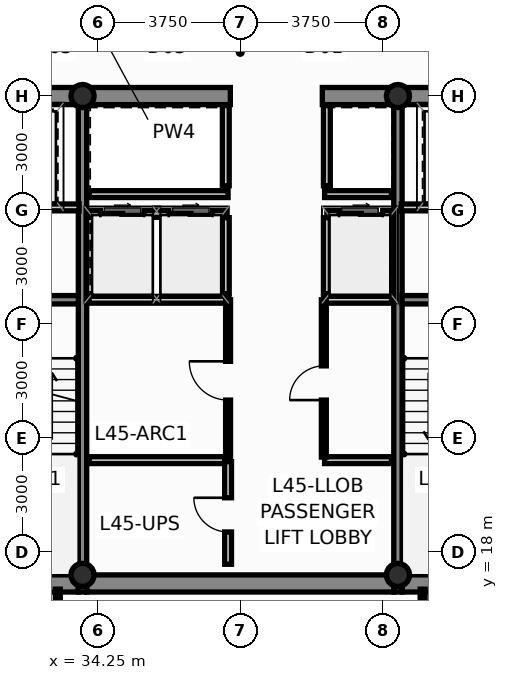
"""IFC4 building model, lengths in metres.
Left out: names, types, materials, properties, quantities, classifications, styles, units other than length and angle.
Written with IfcOpenShell. Run it as: python <this file> out.ifc"""

import sys

from ifc_helpers import new_model, si_unit, direction, frame, frame_2d, origin, origin_2d, place, context, subcontext, project, spatial, rectangle, hollow_circle, extrude, source, transform, mapped, element, fill, save


model = new_model("IFC4")
c1 = context("Model", 3, precision=1e-05, world=origin(), true_north=direction((0.0, 1.0)))
c2 = subcontext(c1, "Body", "Model", "MODEL_VIEW")
j1 = project(units=[si_unit("LENGTHUNIT", "METRE"), si_unit("PLANEANGLEUNIT", "RADIAN")], contexts=[c1])
p1 = place(None, origin())
s1 = spatial("IfcSite", under=j1, at=p1, CompositionType="ELEMENT")
p2 = place(p1, origin())
s2 = spatial("IfcBuilding", under=s1, at=p2, CompositionType="ELEMENT")
p3 = place(p2, frame((0.0, 0.0, 173.1)))
s3 = spatial("IfcBuildingStorey", under=s2, at=p3, CompositionType="ELEMENT", Elevation=173.1)
m1 = source(origin(), c2, "Body", "SweptSolid", [
    extrude(hollow_circle(Radius=0.305, WallThickness=0.025, at=origin_2d()), origin(), (0.0, 0.0, 1.0), 3.65),
])
for number, where, z_axis, x_axis in (
    (1, (33.85, 17.4, 0.0), (0.0, 0.0, 1.0), (1.0, 0.0, 0.0)),
    (2, (42.15, 17.4, 0.0), (0.0, 0.0, 1.0), (1.0, 0.0, 0.0)),
    (3, (33.85, 30.0, 0.0), (0.0, 0.0, 1.0), (1.0, 0.0, 0.0)),
    (4, (42.15, 30.0, 0.0), (0.0, 0.0, 1.0), (1.0, 0.0, 0.0)),
):
    element("IfcColumn", number, at=place(p3, frame(where, z_axis=z_axis, x_axis=x_axis)), inside=s3, PredefinedType="COLUMN", context=c2, shape_type="MappedRepresentation", body=[
        mapped(m1, transform((0.0, 0.0, 0.0), scale=1.0)),
    ])
p4 = place(p3, frame((30.84, 17.175, 0.0), z_axis=(0.0, 0.0, 1.0), x_axis=(1.0, 0.0, 0.0)))
e5 = element("IfcWall", 5, at=p4, inside=s3, PredefinedType="SHEAR", context=c2, shape_type="SweptSolid", body=[
    extrude(rectangle(XDim=2.9, YDim=0.45, at=frame_2d((1.45, 0.0))), origin(), (0.0, 0.0, 1.0), 3.65),
])
p5 = place(p3, frame((33.96, 17.175, 0.0), z_axis=(0.0, 0.0, 1.0), x_axis=(1.0, 0.0, 0.0)))
e6 = element("IfcWall", 6, at=p5, inside=s3, PredefinedType="SHEAR", context=c2, shape_type="SweptSolid", body=[
    extrude(rectangle(XDim=8.08, YDim=0.45, at=frame_2d((4.04, 0.0))), origin(), (0.0, 0.0, 1.0), 3.65),
])
for number, where, z_axis, x_axis in (
    (7, (42.26, 17.175, 0.0), (0.0, 0.0, 1.0), (1.0, 0.0, 0.0)),
    (8, (30.84, 30.0, 0.0), (0.0, 0.0, 1.0), (1.0, 0.0, 0.0)),
):
    element("IfcWall", number, at=place(p3, frame(where, z_axis=z_axis, x_axis=x_axis)), inside=s3, PredefinedType="SHEAR", context=c2, shape_type="SweptSolid", body=[
        extrude(rectangle(XDim=2.9, YDim=0.45, at=frame_2d((1.45, 0.0))), origin(), (0.0, 0.0, 1.0), 3.65),
    ])
p6 = place(p3, frame((33.96, 30.0, 0.0), z_axis=(0.0, 0.0, 1.0), x_axis=(1.0, 0.0, 0.0)))
e9 = element("IfcWall", 9, at=p6, inside=s3, PredefinedType="SHEAR", context=c2, shape_type="SweptSolid", body=[
    extrude(rectangle(XDim=3.78, YDim=0.45, at=frame_2d((1.89, 0.0))), origin(), (0.0, 0.0, 1.0), 3.65),
])
p7 = place(p3, frame((40.16, 30.0, 0.0), z_axis=(0.0, 0.0, 1.0), x_axis=(1.0, 0.0, 0.0)))
e10 = element("IfcWall", 10, at=p7, inside=s3, PredefinedType="SHEAR", context=c2, shape_type="SweptSolid", body=[
    extrude(rectangle(XDim=1.88, YDim=0.45, at=frame_2d((0.94, 0.0))), origin(), (0.0, 0.0, 1.0), 3.65),
])
p8 = place(p3, frame((42.26, 30.0, 0.0), z_axis=(0.0, 0.0, 1.0), x_axis=(1.0, 0.0, 0.0)))
e11 = element("IfcWall", 11, at=p8, inside=s3, PredefinedType="SHEAR", context=c2, shape_type="SweptSolid", body=[
    extrude(rectangle(XDim=2.9, YDim=0.45, at=frame_2d((1.45, 0.0))), origin(), (0.0, 0.0, 1.0), 3.65),
])
for number, where, z_axis, x_axis in (
    (12, (33.85, 16.95, 0.0), (0.0, 0.0, 1.0), (0.0, 1.0, 0.0)),
    (13, (42.15, 16.95, 0.0), (0.0, 0.0, 1.0), (0.0, 1.0, 0.0)),
):
    element("IfcWall", number, at=place(p3, frame(where, z_axis=z_axis, x_axis=x_axis)), inside=s3, PredefinedType="SHEAR", context=c2, shape_type="SweptSolid", body=[
        extrude(rectangle(XDim=13.275, YDim=0.22, at=frame_2d((6.638, 0.0))), origin(), (0.0, 0.0, 1.0), 3.65),
    ])
for number, where, z_axis, x_axis in (
    (14, (30.84, 24.64, 0.0), (0.0, 0.0, 1.0), (1.0, 0.0, 0.0)),
    (15, (42.26, 24.64, 0.0), (0.0, 0.0, 1.0), (1.0, 0.0, 0.0)),
):
    element("IfcWall", number, at=place(p3, frame(where, z_axis=z_axis, x_axis=x_axis)), inside=s3, PredefinedType="SHEAR", context=c2, shape_type="SweptSolid", body=[
        extrude(rectangle(XDim=2.9, YDim=0.22, at=frame_2d((1.45, 0.0))), origin(), (0.0, 0.0, 1.0), 3.65),
    ])
p9 = place(p3, frame((34.02, 26.9, 0.0), z_axis=(0.0, 0.0, 1.0), x_axis=(1.0, 0.0, 0.0)))
e16 = element("IfcWall", 16, at=p9, inside=s3, PredefinedType="PARTITIONING", context=c2, shape_type="SweptSolid", body=[
    extrude(rectangle(XDim=3.6, YDim=0.18, at=frame_2d((1.8, 0.0))), origin(), (0.0, 0.0, 1.0), 3.4),
])
p10 = place(p9, frame((0.3, 0.0, 0.0)))
e17 = element("IfcOpeningElement", 17, at=p10, cuts=e16, PredefinedType="OPENING", context=c2, shape_type="SweptSolid", body=[
    extrude(rectangle(XDim=1.15, YDim=2.2, at=frame_2d((0.575, 1.1))), frame((0.0, 0.102, 0.0), z_axis=(0.0, -1.0, 0.0), x_axis=(1.0, 0.0, 0.0)), (0.0, 0.0, 1.0), 0.204),
])
p11 = place(p9, frame((2.1, 0.0, 0.0)))
e18 = element("IfcOpeningElement", 18, at=p11, cuts=e16, PredefinedType="OPENING", context=c2, shape_type="SweptSolid", body=[
    extrude(rectangle(XDim=1.15, YDim=2.2, at=frame_2d((0.575, 1.1))), frame((0.0, 0.102, 0.0), z_axis=(0.0, -1.0, 0.0), x_axis=(1.0, 0.0, 0.0)), (0.0, 0.0, 1.0), 0.204),
])
p12 = place(p3, frame((40.28, 26.9, 0.0), z_axis=(0.0, 0.0, 1.0), x_axis=(1.0, 0.0, 0.0)))
e19 = element("IfcWall", 19, at=p12, inside=s3, PredefinedType="PARTITIONING", context=c2, shape_type="SweptSolid", body=[
    extrude(rectangle(XDim=1.7, YDim=0.18, at=frame_2d((0.85, 0.0))), origin(), (0.0, 0.0, 1.0), 3.4),
])
p13 = place(p12, frame((0.32, 0.0, 0.0)))
e20 = element("IfcOpeningElement", 20, at=p13, cuts=e19, PredefinedType="OPENING", context=c2, shape_type="SweptSolid", body=[
    extrude(rectangle(XDim=1.15, YDim=2.2, at=frame_2d((0.575, 1.1))), frame((0.0, 0.102, 0.0), z_axis=(0.0, -1.0, 0.0), x_axis=(1.0, 0.0, 0.0)), (0.0, 0.0, 1.0), 0.204),
])
for number, where, z_axis, x_axis in (
    (21, (37.62, 24.8, 0.0), (0.0, 0.0, 1.0), (0.0, 1.0, 0.0)),
    (22, (40.28, 24.8, 0.0), (0.0, 0.0, 1.0), (0.0, 1.0, 0.0)),
):
    element("IfcWall", number, at=place(p3, frame(where, z_axis=z_axis, x_axis=x_axis)), inside=s3, PredefinedType="PARTITIONING", context=c2, shape_type="SweptSolid", body=[
        extrude(rectangle(XDim=2.0, YDim=0.18, at=frame_2d((1.0, 0.0))), origin(), (0.0, 0.0, 1.0), 3.4),
    ])
p14 = place(p3, frame((34.02, 24.64, 0.0), z_axis=(0.0, 0.0, 1.0), x_axis=(1.0, 0.0, 0.0)))
e23 = element("IfcWall", 23, at=p14, inside=s3, PredefinedType="PARTITIONING", context=c2, shape_type="SweptSolid", body=[
    extrude(rectangle(XDim=3.68, YDim=0.18, at=frame_2d((1.84, 0.0))), origin(), (0.0, 0.0, 1.0), 3.4),
])
p15 = place(p3, frame((40.2, 24.64, 0.0), z_axis=(0.0, 0.0, 1.0), x_axis=(1.0, 0.0, 0.0)))
e24 = element("IfcWall", 24, at=p15, inside=s3, PredefinedType="PARTITIONING", context=c2, shape_type="SweptSolid", body=[
    extrude(rectangle(XDim=1.78, YDim=0.18, at=frame_2d((0.89, 0.0))), origin(), (0.0, 0.0, 1.0), 3.4),
])
p16 = place(p3, frame((34.02, 27.42, 0.0), z_axis=(0.0, 0.0, 1.0), x_axis=(1.0, 0.0, 0.0)))
e25 = element("IfcWall", 25, at=p16, inside=s3, PredefinedType="PARTITIONING", context=c2, shape_type="SweptSolid", body=[
    extrude(rectangle(XDim=3.66, YDim=0.18, at=frame_2d((1.83, 0.0))), origin(), (0.0, 0.0, 1.0), 3.4),
])
p17 = place(p3, frame((40.22, 27.42, 0.0), z_axis=(0.0, 0.0, 1.0), x_axis=(1.0, 0.0, 0.0)))
e26 = element("IfcWall", 26, at=p17, inside=s3, PredefinedType="PARTITIONING", context=c2, shape_type="SweptSolid", body=[
    extrude(rectangle(XDim=1.76, YDim=0.18, at=frame_2d((0.88, 0.0))), origin(), (0.0, 0.0, 1.0), 3.4),
])
for number, where, z_axis, x_axis in (
    (27, (37.62, 27.64, 0.0), (0.0, 0.0, 1.0), (0.0, 1.0, 0.0)),
    (28, (40.28, 27.64, 0.0), (0.0, 0.0, 1.0), (0.0, 1.0, 0.0)),
):
    element("IfcWall", number, at=place(p3, frame(where, z_axis=z_axis, x_axis=x_axis)), inside=s3, PredefinedType="PARTITIONING", context=c2, shape_type="SweptSolid", body=[
        extrude(rectangle(XDim=2.11, YDim=0.18, at=frame_2d((1.055, 0.0))), origin(), (0.0, 0.0, 1.0), 3.4),
    ])
for number, where, z_axis, x_axis in (
    (29, (30.86, 27.07, 0.0), (0.0, 0.0, 1.0), (1.0, 0.0, 0.0)),
    (30, (42.24, 27.07, 0.0), (0.0, 0.0, 1.0), (1.0, 0.0, 0.0)),
):
    element("IfcWall", number, at=place(p3, frame(where, z_axis=z_axis, x_axis=x_axis)), inside=s3, PredefinedType="PARTITIONING", context=c2, shape_type="SweptSolid", body=[
        extrude(rectangle(XDim=2.9, YDim=0.18, at=frame_2d((1.45, 0.0))), origin(), (0.0, 0.0, 1.0), 3.4),
    ])
p18 = place(p3, frame((34.02, 20.42, 0.0), z_axis=(0.0, 0.0, 1.0), x_axis=(1.0, 0.0, 0.0)))
e31 = element("IfcWall", 31, at=p18, inside=s3, PredefinedType="PARTITIONING", context=c2, shape_type="SweptSolid", body=[
    extrude(rectangle(XDim=3.64, YDim=0.18, at=frame_2d((1.82, 0.0))), origin(), (0.0, 0.0, 1.0), 3.4),
])
p19 = place(p3, frame((40.22, 20.42, 0.0), z_axis=(0.0, 0.0, 1.0), x_axis=(1.0, 0.0, 0.0)))
e32 = element("IfcWall", 32, at=p19, inside=s3, PredefinedType="PARTITIONING", context=c2, shape_type="SweptSolid", body=[
    extrude(rectangle(XDim=1.76, YDim=0.18, at=frame_2d((0.88, 0.0))), origin(), (0.0, 0.0, 1.0), 3.4),
])
p20 = place(p3, frame((37.68, 20.5, 0.0), z_axis=(0.0, 0.0, 1.0), x_axis=(0.0, 1.0, 0.0)))
e33 = element("IfcWall", 33, at=p20, inside=s3, PredefinedType="PARTITIONING", context=c2, shape_type="SweptSolid", body=[
    extrude(rectangle(XDim=4.14, YDim=0.13, at=frame_2d((2.07, 0.0))), origin(), (0.0, 0.0, 1.0), 3.4),
])
p21 = place(p20, frame((1.5, 0.0, 0.0)))
e34 = element("IfcOpeningElement", 34, at=p21, cuts=e33, PredefinedType="OPENING", context=c2, shape_type="SweptSolid", body=[
    extrude(rectangle(XDim=1.02, YDim=2.15, at=frame_2d((0.51, 1.075))), frame((0.0, 0.077, 0.0), z_axis=(0.0, -1.0, 0.0), x_axis=(1.0, 0.0, 0.0)), (0.0, 0.0, 1.0), 0.154),
])
p22 = place(p3, frame((40.2, 20.5, 0.0), z_axis=(0.0, 0.0, 1.0), x_axis=(0.0, 1.0, 0.0)))
e35 = element("IfcWall", 35, at=p22, inside=s3, PredefinedType="PARTITIONING", context=c2, shape_type="SweptSolid", body=[
    extrude(rectangle(XDim=4.14, YDim=0.13, at=frame_2d((2.07, 0.0))), origin(), (0.0, 0.0, 1.0), 3.4),
])
p23 = place(p22, frame((1.5, 0.0, 0.0)))
e36 = element("IfcOpeningElement", 36, at=p23, cuts=e35, PredefinedType="OPENING", context=c2, shape_type="SweptSolid", body=[
    extrude(rectangle(XDim=0.9, YDim=2.1, at=frame_2d((0.45, 1.05))), frame((0.0, 0.077, 0.0), z_axis=(0.0, -1.0, 0.0), x_axis=(1.0, 0.0, 0.0)), (0.0, 0.0, 1.0), 0.154),
])
p24 = place(p3, frame((37.68, 17.68, 0.0), z_axis=(0.0, 0.0, 1.0), x_axis=(0.0, 1.0, 0.0)))
e37 = element("IfcWall", 37, at=p24, inside=s3, PredefinedType="PARTITIONING", context=c2, shape_type="SweptSolid", body=[
    extrude(rectangle(XDim=2.7, YDim=0.18, at=frame_2d((1.35, 0.0))), origin(), (0.0, 0.0, 1.0), 3.4),
])
p25 = place(p24, frame((0.85, 0.0, 0.0)))
e38 = element("IfcOpeningElement", 38, at=p25, cuts=e37, PredefinedType="OPENING", context=c2, shape_type="SweptSolid", body=[
    extrude(rectangle(XDim=0.9, YDim=2.1, at=frame_2d((0.45, 1.05))), frame((0.0, 0.102, 0.0), z_axis=(0.0, -1.0, 0.0), x_axis=(1.0, 0.0, 0.0)), (0.0, 0.0, 1.0), 0.204),
])
for number, where, z_axis, x_axis in (
    (39, (33.2, 12.595, 0.0), (0.0, 0.0, 1.0), (0.0, 1.0, 0.0)),
    (40, (42.8, 12.595, 0.0), (0.0, 0.0, 1.0), (0.0, 1.0, 0.0)),
):
    element("IfcWall", number, at=place(p3, frame(where, z_axis=z_axis, x_axis=x_axis)), inside=s3, PredefinedType="PARTITIONING", context=c2, shape_type="SweptSolid", body=[
        extrude(rectangle(XDim=4.43, YDim=0.13, at=frame_2d((2.215, 0.0))), origin(), (0.0, 0.0, 1.0), 3.4),
    ])
p26 = place(p10, origin())
e41 = element("IfcDoor", 41, at=p26, inside=s3, OperationType="SLIDING_TO_LEFT", PredefinedType="DOOR", context=c2, shape_type="SweptSolid", body=[
    extrude(rectangle(XDim=1.15, YDim=2.2, at=frame_2d((0.575, 1.1))), frame((0.0, 0.025, 0.0), z_axis=(0.0, -1.0, 0.0), x_axis=(1.0, 0.0, 0.0)), (0.0, 0.0, 1.0), 0.05),
])
fill(e17, e41)
p27 = place(p11, origin())
e42 = element("IfcDoor", 42, at=p27, inside=s3, OperationType="SLIDING_TO_RIGHT", PredefinedType="DOOR", context=c2, shape_type="SweptSolid", body=[
    extrude(rectangle(XDim=1.15, YDim=2.2, at=frame_2d((0.575, 1.1))), frame((0.0, 0.025, 0.0), z_axis=(0.0, -1.0, 0.0), x_axis=(1.0, 0.0, 0.0)), (0.0, 0.0, 1.0), 0.05),
])
fill(e18, e42)
p28 = place(p13, origin())
e43 = element("IfcDoor", 43, at=p28, inside=s3, OperationType="SLIDING_TO_LEFT", PredefinedType="DOOR", context=c2, shape_type="SweptSolid", body=[
    extrude(rectangle(XDim=1.15, YDim=2.2, at=frame_2d((0.575, 1.1))), frame((0.0, 0.025, 0.0), z_axis=(0.0, -1.0, 0.0), x_axis=(1.0, 0.0, 0.0)), (0.0, 0.0, 1.0), 0.05),
])
fill(e20, e43)
p29 = place(p21, origin())
e44 = element("IfcDoor", 44, at=p29, inside=s3, OperationType="SINGLE_SWING_RIGHT", PredefinedType="DOOR", context=c2, shape_type="SweptSolid", body=[
    extrude(rectangle(XDim=1.02, YDim=2.15, at=frame_2d((0.51, 1.075))), frame((0.0, 0.025, 0.0), z_axis=(0.0, -1.0, 0.0), x_axis=(1.0, 0.0, 0.0)), (0.0, 0.0, 1.0), 0.05),
])
fill(e34, e44)
p30 = place(p23, origin())
e45 = element("IfcDoor", 45, at=p30, inside=s3, OperationType="SINGLE_SWING_LEFT", PredefinedType="DOOR", context=c2, shape_type="SweptSolid", body=[
    extrude(rectangle(XDim=0.9, YDim=2.1, at=frame_2d((0.45, 1.05))), frame((0.0, 0.025, 0.0), z_axis=(0.0, -1.0, 0.0), x_axis=(1.0, 0.0, 0.0)), (0.0, 0.0, 1.0), 0.05),
])
fill(e36, e45)
p31 = place(p25, origin())
e46 = element("IfcDoor", 46, at=p31, inside=s3, OperationType="SINGLE_SWING_RIGHT", PredefinedType="DOOR", context=c2, shape_type="SweptSolid", body=[
    extrude(rectangle(XDim=0.9, YDim=2.1, at=frame_2d((0.45, 1.05))), frame((0.0, 0.025, 0.0), z_axis=(0.0, -1.0, 0.0), x_axis=(1.0, 0.0, 0.0)), (0.0, 0.0, 1.0), 0.05),
])
fill(e38, e46)
save(model, sys.argv[1])
